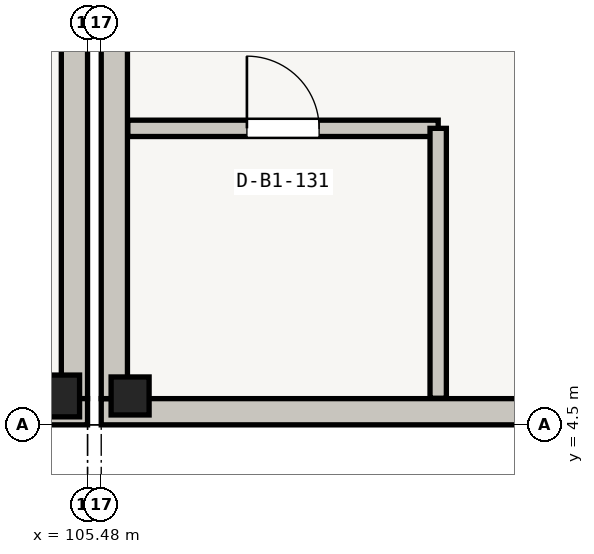
"""IFC4 building model, lengths in metres.
Left out: names, types, materials, properties, quantities, classifications, styles, units other than length and angle.
Written with IfcOpenShell. Run it as: python <this file> out.ifc"""

import sys

from ifc_helpers import new_model, si_unit, direction, frame, frame_2d, origin, origin_2d, place, context, subcontext, project, spatial, rectangle, extrude, element, fill, save


model = new_model("IFC4")
c1 = context("Model", 3, precision=1e-05, world=origin(), true_north=direction((0.0, 1.0)))
c2 = subcontext(c1, "Body", "Model", "MODEL_VIEW")
j1 = project(units=[si_unit("LENGTHUNIT", "METRE"), si_unit("PLANEANGLEUNIT", "RADIAN")], contexts=[c1])
p1 = place(None, origin())
s1 = spatial("IfcSite", under=j1, at=p1, CompositionType="ELEMENT")
p2 = place(p1, origin())
s2 = spatial("IfcBuilding", under=s1, at=p2, CompositionType="ELEMENT")
p3 = place(p2, frame((0.0, 0.0, -4.5)))
s3 = spatial("IfcBuildingStorey", under=s2, at=p3, CompositionType="ELEMENT", Elevation=-4.5)
p4 = place(p3, frame((105.1, 4.88, -0.42), z_axis=(0.0, 0.0, 1.0), x_axis=(1.0, 0.0, 0.0)))
e1 = element("IfcColumn", 1, at=p4, inside=s3, PredefinedType="COLUMN", context=c2, shape_type="SweptSolid", body=[
    extrude(rectangle(XDim=0.55, YDim=0.55, at=origin_2d()), origin(), (0.0, 0.0, 1.0), 4.605),
])
p5 = place(p3, frame((106.04, 4.88, -0.42), z_axis=(0.0, 0.0, 1.0), x_axis=(1.0, 0.0, 0.0)))
e2 = element("IfcColumn", 2, at=p5, inside=s3, PredefinedType="COLUMN", context=c2, shape_type="SweptSolid", body=[
    extrude(rectangle(XDim=0.5, YDim=0.5, at=origin_2d()), origin(), (0.0, 0.0, 1.0), 4.625),
])
p6 = place(p3, frame((105.308, 11.7, -0.42), z_axis=(0.0, 0.0, 1.0), x_axis=(0.0, -1.0, 0.0)))
e3 = element("IfcWall", 3, at=p6, inside=s3, PredefinedType="SOLIDWALL", context=c2, shape_type="SweptSolid", body=[
    extrude(rectangle(XDim=6.855, YDim=0.345, at=frame_2d((3.427, 0.0))), origin(), (0.0, 0.0, 1.0), 4.01),
])
p7 = place(p3, frame((105.48, 4.673, -0.42), z_axis=(0.0, 0.0, 1.0), x_axis=(-1.0, 0.0, 0.0)))
e4 = element("IfcWall", 4, at=p7, inside=s3, PredefinedType="SOLIDWALL", context=c2, shape_type="SweptSolid", body=[
    extrude(rectangle(XDim=7.2, YDim=0.345, at=frame_2d((3.6, 0.0))), origin(), (0.0, 0.0, 1.0), 3.97),
])
p8 = place(p3, frame((113.1, 4.673, -0.42), z_axis=(0.0, 0.0, 1.0), x_axis=(-1.0, 0.0, 0.0)))
e5 = element("IfcWall", 5, at=p8, inside=s3, PredefinedType="SOLIDWALL", context=c2, shape_type="SweptSolid", body=[
    extrude(rectangle(XDim=7.44, YDim=0.345, at=frame_2d((3.72, 0.0))), origin(), (0.0, 0.0, 1.0), 3.99),
])
p9 = place(p3, frame((105.833, 4.845, -0.42), z_axis=(0.0, 0.0, 1.0), x_axis=(0.0, 1.0, 0.0)))
e6 = element("IfcWall", 6, at=p9, inside=s3, PredefinedType="SOLIDWALL", context=c2, shape_type="SweptSolid", body=[
    extrude(rectangle(XDim=6.855, YDim=0.345, at=frame_2d((3.427, 0.0))), origin(), (0.0, 0.0, 1.0), 3.99),
])
p10 = place(p3, frame((106.01, 8.401, 0.0), z_axis=(0.0, 0.0, 1.0), x_axis=(1.0, 0.0, 0.0)))
e7 = element("IfcWall", 7, at=p10, inside=s3, PredefinedType="PLUMBINGWALL", context=c2, shape_type="SweptSolid", body=[
    extrude(rectangle(XDim=4.083, YDim=0.215, at=frame_2d((2.042, 0.0))), origin(), (0.0, 0.0, 1.0), 3.225),
])
p11 = place(p10, frame((1.567, 0.0, 0.0)))
e8 = element("IfcOpeningElement", 8, at=p11, cuts=e7, PredefinedType="OPENING", context=c2, shape_type="SweptSolid", body=[
    extrude(rectangle(XDim=0.95, YDim=2.05, at=frame_2d((0.475, 1.025))), frame((0.0, 0.107, 0.0), z_axis=(0.0, -1.0, 0.0), x_axis=(1.0, 0.0, 0.0)), (0.0, 0.0, 1.0), 0.215),
])
p12 = place(p3, frame((110.094, 8.401, 0.0), z_axis=(0.0, 0.0, 1.0), x_axis=(0.0, -1.0, 0.0)))
e9 = element("IfcWall", 9, at=p12, inside=s3, PredefinedType="PLUMBINGWALL", context=c2, shape_type="SweptSolid", body=[
    extrude(rectangle(XDim=3.551, YDim=0.215, at=frame_2d((1.775, 0.0))), origin(), (0.0, 0.0, 1.0), 3.225),
])
p13 = place(p11, origin())
e10 = element("IfcDoor", 10, at=p13, inside=s3, OperationType="SINGLE_SWING_LEFT", PredefinedType="DOOR", context=c2, shape_type="SweptSolid", body=[
    extrude(rectangle(XDim=0.95, YDim=2.05, at=frame_2d((0.475, 1.025))), frame((0.0, 0.025, 0.0), z_axis=(0.0, -1.0, 0.0), x_axis=(1.0, 0.0, 0.0)), (0.0, 0.0, 1.0), 0.05),
])
fill(e8, e10)
save(model, sys.argv[1])
